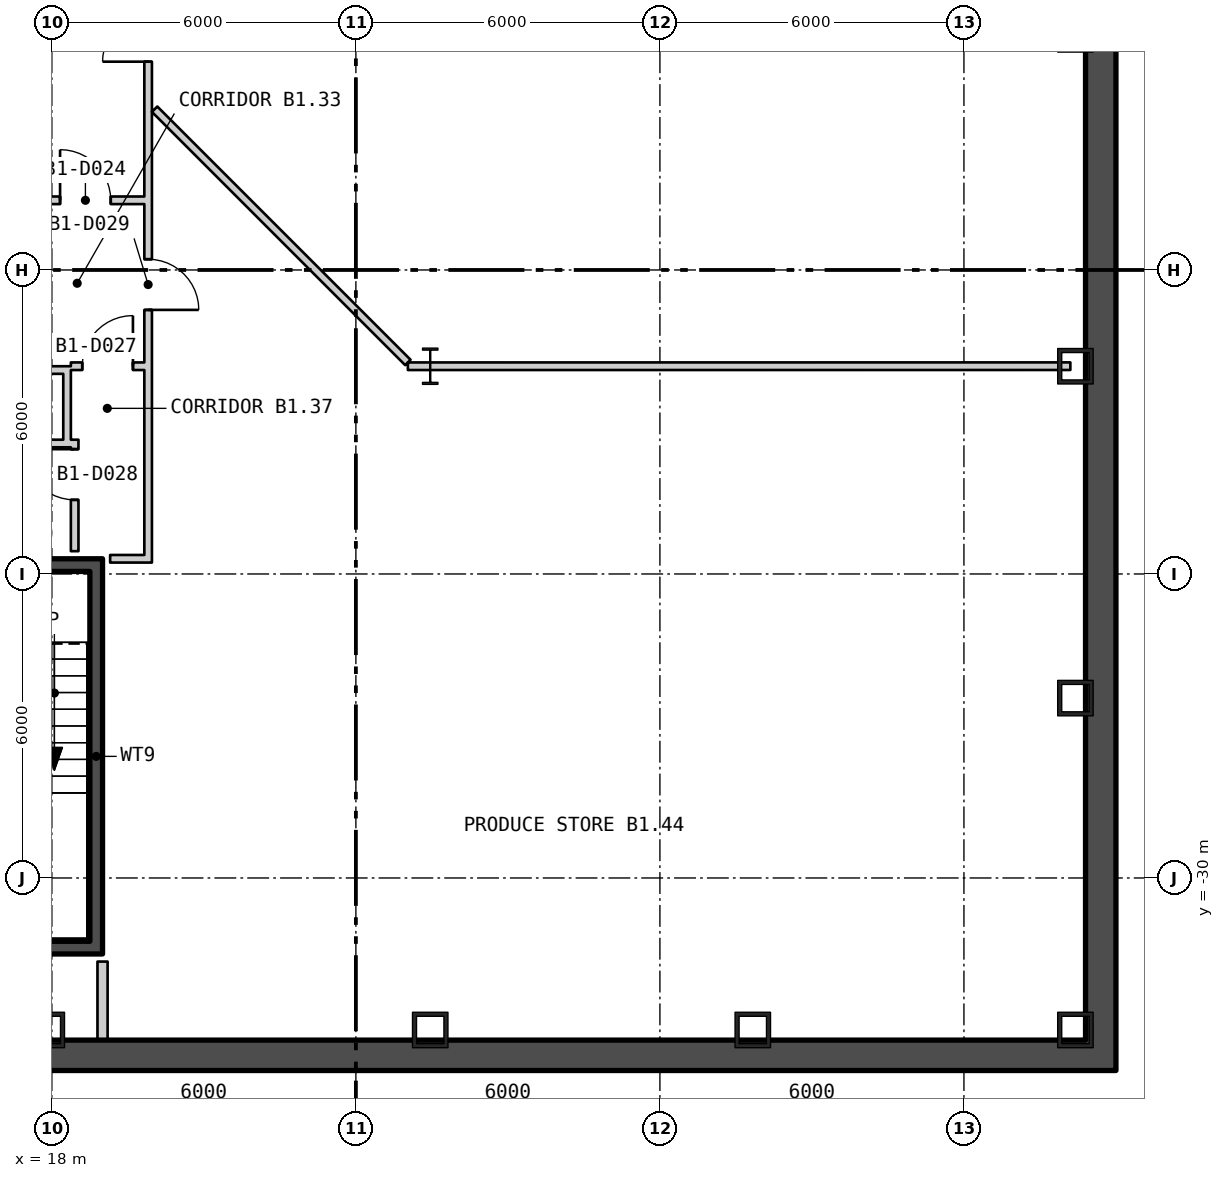
"""IFC4 building model, lengths in metres.
Left out: names, types, materials, properties, quantities, classifications, styles, units other than length and angle.
Written with IfcOpenShell. Run it as: python <this file> out.ifc"""

import sys

from ifc_helpers import new_model, si_unit, direction, frame, frame_2d, origin, origin_2d, place, context, subcontext, project, spatial, rectangle, hollow_rectangle, i_section, extrude, element, fill, save


model = new_model("IFC4")
c1 = context("Model", 3, precision=1e-05, world=origin(), true_north=direction((0.0, 1.0)))
c2 = subcontext(c1, "Body", "Model", "MODEL_VIEW")
j1 = project(units=[si_unit("LENGTHUNIT", "METRE"), si_unit("PLANEANGLEUNIT", "RADIAN")], contexts=[c1])
p1 = place(None, origin())
s1 = spatial("IfcSite", under=j1, at=p1, CompositionType="ELEMENT")
p2 = place(p1, origin())
s2 = spatial("IfcBuilding", under=s1, at=p2, CompositionType="ELEMENT")
p3 = place(p2, frame((0.0, 0.0, -5.7)))
s3 = spatial("IfcBuildingStorey", under=s2, at=p3, CompositionType="ELEMENT", Elevation=-5.7)
for number, where, z_axis, x_axis in (
    (1, (38.2, -33.0, 0.0), (0.0, 0.0, 1.0), (0.0, 1.0, 0.0)),
    (2, (38.2, -26.45, 0.0), (0.0, 0.0, 1.0), (0.0, 1.0, 0.0)),
    (3, (38.2, -19.9, 0.0), (0.0, 0.0, 1.0), (0.0, 1.0, 0.0)),
    (4, (17.9, -33.0, 0.0), (0.0, 0.0, 1.0), (1.0, 0.0, 0.0)),
    (5, (25.467, -33.0, 0.0), (0.0, 0.0, 1.0), (1.0, 0.0, 0.0)),
    (6, (31.833, -33.0, 0.0), (0.0, 0.0, 1.0), (1.0, 0.0, 0.0)),
):
    element("IfcColumn", number, at=place(p3, frame(where, z_axis=z_axis, x_axis=x_axis)), inside=s3, PredefinedType="COLUMN", context=c2, shape_type="SweptSolid", body=[
        extrude(hollow_rectangle(XDim=0.7, YDim=0.7, WallThickness=0.08, at=origin_2d()), origin(), (0.0, 0.0, 1.0), 5.7),
    ])
p4 = place(p3, frame((25.467, -19.9, 0.0), z_axis=(0.0, 0.0, 1.0), x_axis=(1.0, 0.0, 0.0)))
e7 = element("IfcColumn", 7, at=p4, inside=s3, PredefinedType="COLUMN", context=c2, shape_type="SweptSolid", body=[
    extrude(i_section(OverallWidth=0.304, OverallDepth=0.716, WebThickness=0.021, FlangeThickness=0.04, at=origin_2d()), origin(), (0.0, 0.0, 1.0), 5.7),
])
p5 = place(p3, frame((-39.0, -33.5, -0.4), z_axis=(0.0, 0.0, 1.0), x_axis=(1.0, 0.0, 0.0)))
e8 = element("IfcWall", 8, at=p5, inside=s3, PredefinedType="STANDARD", context=c2, shape_type="SweptSolid", body=[
    extrude(rectangle(XDim=78.0, YDim=0.6, at=frame_2d((39.0, 0.0))), origin(), (0.0, 0.0, 1.0), 5.7),
])
p6 = place(p3, frame((38.7, -33.2, -0.4), z_axis=(0.0, 0.0, 1.0), x_axis=(0.0, 1.0, 0.0)))
e9 = element("IfcWall", 9, at=p6, inside=s3, PredefinedType="STANDARD", context=c2, shape_type="SweptSolid", body=[
    extrude(rectangle(XDim=52.8, YDim=0.6, at=frame_2d((26.4, 0.0))), origin(), (0.0, 0.0, 1.0), 5.7),
])
p7 = place(p3, frame((18.875, -31.25, 0.0), z_axis=(0.0, 0.0, 1.0), x_axis=(0.0, 1.0, 0.0)))
e10 = element("IfcWall", 10, at=p7, inside=s3, PredefinedType="SHEAR", context=c2, shape_type="SweptSolid", body=[
    extrude(rectangle(XDim=7.3, YDim=0.25, at=frame_2d((3.65, 0.0))), origin(), (0.0, 0.0, 1.0), 5.25),
])
p8 = place(p3, frame((15.5, -31.375, 0.0), z_axis=(0.0, 0.0, 1.0), x_axis=(1.0, 0.0, 0.0)))
e11 = element("IfcWall", 11, at=p8, inside=s3, PredefinedType="SHEAR", context=c2, shape_type="SweptSolid", body=[
    extrude(rectangle(XDim=3.5, YDim=0.25, at=frame_2d((1.75, 0.0))), origin(), (0.0, 0.0, 1.0), 5.25),
])
p9 = place(p3, frame((15.5, -23.825, 0.0), z_axis=(0.0, 0.0, 1.0), x_axis=(1.0, 0.0, 0.0)))
e12 = element("IfcWall", 12, at=p9, inside=s3, PredefinedType="SHEAR", context=c2, shape_type="SweptSolid", body=[
    extrude(rectangle(XDim=3.5, YDim=0.25, at=frame_2d((1.75, 0.0))), origin(), (0.0, 0.0, 1.0), 5.25),
])
p10 = place(p9, frame((1.15, 0.0, 0.0)))
e13 = element("IfcOpeningElement", 13, at=p10, cuts=e12, PredefinedType="OPENING", context=c2, shape_type="SweptSolid", body=[
    extrude(rectangle(XDim=1.2, YDim=2.1, at=frame_2d((0.6, 1.05))), frame((0.0, 0.135, 0.0), z_axis=(0.0, -1.0, 0.0), x_axis=(1.0, 0.0, 0.0)), (0.0, 0.0, 1.0), 0.27),
])
p11 = place(p3, frame((17.5, -16.625, 0.0), z_axis=(0.0, 0.0, 1.0), x_axis=(1.0, 0.0, 0.0)))
e14 = element("IfcWall", 14, at=p11, inside=s3, PredefinedType="PARTITIONING", context=c2, shape_type="SweptSolid", body=[
    extrude(rectangle(XDim=2.325, YDim=0.15, at=frame_2d((1.163, 0.0))), origin(), (0.0, 0.0, 1.0), 5.25),
])
p12 = place(p11, frame((0.662, 0.0, 0.0)))
e15 = element("IfcOpeningElement", 15, at=p12, cuts=e14, PredefinedType="OPENING", context=c2, shape_type="SweptSolid", body=[
    extrude(rectangle(XDim=1.0, YDim=2.1, at=frame_2d((0.5, 1.05))), frame((0.0, 0.085, 0.0), z_axis=(0.0, -1.0, 0.0), x_axis=(1.0, 0.0, 0.0)), (0.0, 0.0, 1.0), 0.17),
])
for number, where, z_axis, x_axis in (
    (16, (17.575, -21.425, 0.0), (0.0, 0.0, 1.0), (1.0, 0.0, 0.0)),
    (17, (17.575, -19.975, 0.0), (0.0, 0.0, 1.0), (1.0, 0.0, 0.0)),
):
    element("IfcWall", number, at=place(p3, frame(where, z_axis=z_axis, x_axis=x_axis)), inside=s3, PredefinedType="PARTITIONING", context=c2, shape_type="SweptSolid", body=[
        extrude(rectangle(XDim=0.65, YDim=0.15, at=frame_2d((0.325, 0.0))), origin(), (0.0, 0.0, 1.0), 5.25),
    ])
p13 = place(p3, frame((18.3, -21.5, 0.0), z_axis=(0.0, 0.0, 1.0), x_axis=(0.0, 1.0, 0.0)))
e18 = element("IfcWall", 18, at=p13, inside=s3, PredefinedType="PARTITIONING", context=c2, shape_type="SweptSolid", body=[
    extrude(rectangle(XDim=1.6, YDim=0.15, at=frame_2d((0.8, 0.0))), origin(), (0.0, 0.0, 1.0), 5.25),
])
p14 = place(p3, frame((18.375, -19.9, 0.0), z_axis=(0.0, 0.0, 1.0), x_axis=(1.0, 0.0, 0.0)))
e19 = element("IfcWall", 19, at=p14, inside=s3, PredefinedType="PARTITIONING", context=c2, shape_type="SweptSolid", body=[
    extrude(rectangle(XDim=1.45, YDim=0.15, at=frame_2d((0.725, 0.0))), origin(), (0.0, 0.0, 1.0), 5.25),
])
p15 = place(p14, frame((0.225, 0.0, 0.0)))
e20 = element("IfcOpeningElement", 20, at=p15, cuts=e19, PredefinedType="OPENING", context=c2, shape_type="SweptSolid", body=[
    extrude(rectangle(XDim=1.0, YDim=2.1, at=frame_2d((0.5, 1.05))), frame((0.0, 0.085, 0.0), z_axis=(0.0, -1.0, 0.0), x_axis=(1.0, 0.0, 0.0)), (0.0, 0.0, 1.0), 0.17),
])
p16 = place(p3, frame((18.45, -23.55, 0.0), z_axis=(0.0, 0.0, 1.0), x_axis=(0.0, 1.0, 0.0)))
e21 = element("IfcWall", 21, at=p16, inside=s3, PredefinedType="PARTITIONING", context=c2, shape_type="SweptSolid", body=[
    extrude(rectangle(XDim=2.2, YDim=0.15, at=frame_2d((1.1, 0.0))), origin(), (0.0, 0.0, 1.0), 5.25),
])
p17 = place(p16, frame((1.013, 0.0, 0.0)))
e22 = element("IfcOpeningElement", 22, at=p17, cuts=e21, PredefinedType="OPENING", context=c2, shape_type="SweptSolid", body=[
    extrude(rectangle(XDim=1.0, YDim=2.1, at=frame_2d((0.5, 1.05))), frame((0.0, 0.085, 0.0), z_axis=(0.0, -1.0, 0.0), x_axis=(1.0, 0.0, 0.0)), (0.0, 0.0, 1.0), 0.17),
])
p18 = place(p3, frame((19.0, -33.348, 0.0), z_axis=(0.0, 0.0, 1.0), x_axis=(0.0, 1.0, 0.0)))
e23 = element("IfcWall", 23, at=p18, inside=s3, PredefinedType="PARTITIONING", context=c2, shape_type="SweptSolid", body=[
    extrude(rectangle(XDim=1.698, YDim=0.2, at=frame_2d((0.849, 0.0))), origin(), (0.0, 0.0, 1.0), 5.25),
])
p19 = place(p3, frame((19.15, -23.7, 0.0), z_axis=(0.0, 0.0, 1.0), x_axis=(1.0, 0.0, 0.0)))
e24 = element("IfcWall", 24, at=p19, inside=s3, PredefinedType="PARTITIONING", context=c2, shape_type="SweptSolid", body=[
    extrude(rectangle(XDim=0.675, YDim=0.15, at=frame_2d((0.338, 0.0))), origin(), (0.0, 0.0, 1.0), 5.25),
])
p20 = place(p3, frame((19.9, -23.775, 0.0), z_axis=(0.0, 0.0, 1.0), x_axis=(0.0, 1.0, 0.0)))
e25 = element("IfcWall", 25, at=p20, inside=s3, PredefinedType="PARTITIONING", context=c2, shape_type="SweptSolid", body=[
    extrude(rectangle(XDim=21.187, YDim=0.15, at=frame_2d((10.594, 0.0))), origin(), (0.0, 0.0, 1.0), 5.25),
])
p21 = place(p20, frame((4.987, 0.0, 0.0)))
e26 = element("IfcOpeningElement", 26, at=p21, cuts=e25, PredefinedType="OPENING", context=c2, shape_type="SweptSolid", body=[
    extrude(rectangle(XDim=1.0, YDim=2.1, at=frame_2d((0.5, 1.05))), frame((0.0, 0.085, 0.0), z_axis=(0.0, -1.0, 0.0), x_axis=(1.0, 0.0, 0.0)), (0.0, 0.0, 1.0), 0.17),
])
p22 = place(p20, frame((9.886, 0.0, 0.0)))
e27 = element("IfcOpeningElement", 27, at=p22, cuts=e25, PredefinedType="OPENING", context=c2, shape_type="SweptSolid", body=[
    extrude(rectangle(XDim=1.8, YDim=2.1, at=frame_2d((0.9, 1.05))), frame((0.0, 0.085, 0.0), z_axis=(0.0, -1.0, 0.0), x_axis=(1.0, 0.0, 0.0)), (0.0, 0.0, 1.0), 0.17),
])
p23 = place(p20, frame((14.973, 0.0, 0.0)))
e28 = element("IfcOpeningElement", 28, at=p23, cuts=e25, PredefinedType="OPENING", context=c2, shape_type="SweptSolid", body=[
    extrude(rectangle(XDim=1.8, YDim=2.1, at=frame_2d((0.9, 1.05))), frame((0.0, 0.085, 0.0), z_axis=(0.0, -1.0, 0.0), x_axis=(1.0, 0.0, 0.0)), (0.0, 0.0, 1.0), 0.17),
])
p24 = place(p20, frame((19.062, 0.0, 0.0)))
e29 = element("IfcOpeningElement", 29, at=p24, cuts=e25, PredefinedType="OPENING", context=c2, shape_type="SweptSolid", body=[
    extrude(rectangle(XDim=1.0, YDim=2.1, at=frame_2d((0.5, 1.05))), frame((0.0, 0.085, 0.0), z_axis=(0.0, -1.0, 0.0), x_axis=(1.0, 0.0, 0.0)), (0.0, 0.0, 1.0), 0.17),
])
p25 = place(p3, frame((20.028, -14.827, 0.0), z_axis=(0.0, 0.0, 1.0), x_axis=(0.707106781187, -0.707106781187, 0.0)))
e30 = element("IfcWall", 30, at=p25, inside=s3, PredefinedType="PARTITIONING", context=c2, shape_type="SweptSolid", body=[
    extrude(rectangle(XDim=7.068, YDim=0.15, at=frame_2d((3.534, 0.0))), origin(), (0.0, 0.0, 1.0), 5.25),
])
p26 = place(p3, frame((25.026, -19.9, 0.0), z_axis=(0.0, 0.0, 1.0), x_axis=(0.999999997075, 7.6487685e-05, 0.0)))
e31 = element("IfcWall", 31, at=p26, inside=s3, PredefinedType="PARTITIONING", context=c2, shape_type="SweptSolid", body=[
    extrude(rectangle(XDim=13.074, YDim=0.15, at=frame_2d((6.537, 0.0))), origin(), (0.0, 0.0, 1.0), 5.25),
])
p27 = place(p12, origin())
e32 = element("IfcDoor", 32, at=p27, inside=s3, OperationType="SINGLE_SWING_RIGHT", PredefinedType="DOOR", context=c2, shape_type="SweptSolid", body=[
    extrude(rectangle(XDim=1.0, YDim=2.1, at=frame_2d((0.5, 1.05))), frame((0.0, 0.025, 0.0), z_axis=(0.0, -1.0, 0.0), x_axis=(1.0, 0.0, 0.0)), (0.0, 0.0, 1.0), 0.05),
])
fill(e15, e32)
p28 = place(p15, origin())
e33 = element("IfcDoor", 33, at=p28, inside=s3, OperationType="SINGLE_SWING_LEFT", PredefinedType="DOOR", context=c2, shape_type="SweptSolid", body=[
    extrude(rectangle(XDim=1.0, YDim=2.1, at=frame_2d((0.5, 1.05))), frame((0.0, 0.025, 0.0), z_axis=(0.0, -1.0, 0.0), x_axis=(1.0, 0.0, 0.0)), (0.0, 0.0, 1.0), 0.05),
])
fill(e20, e33)
p29 = place(p17, origin())
e34 = element("IfcDoor", 34, at=p29, inside=s3, OperationType="SINGLE_SWING_LEFT", PredefinedType="DOOR", context=c2, shape_type="SweptSolid", body=[
    extrude(rectangle(XDim=1.0, YDim=2.1, at=frame_2d((0.5, 1.05))), frame((0.0, 0.025, 0.0), z_axis=(0.0, -1.0, 0.0), x_axis=(1.0, 0.0, 0.0)), (0.0, 0.0, 1.0), 0.05),
])
fill(e22, e34)
p30 = place(p21, origin())
e35 = element("IfcDoor", 35, at=p30, inside=s3, OperationType="SINGLE_SWING_LEFT", PredefinedType="DOOR", context=c2, shape_type="SweptSolid", body=[
    extrude(rectangle(XDim=1.0, YDim=2.1, at=frame_2d((0.5, 1.05))), frame((0.0, 0.025, 0.0), z_axis=(0.0, -1.0, 0.0), x_axis=(1.0, 0.0, 0.0)), (0.0, 0.0, 1.0), 0.05),
])
fill(e26, e35)
p31 = place(p22, origin())
e36 = element("IfcDoor", 36, at=p31, inside=s3, OperationType="DOUBLE_DOOR_SINGLE_SWING", PredefinedType="DOOR", context=c2, shape_type="SweptSolid", body=[
    extrude(rectangle(XDim=1.8, YDim=2.1, at=frame_2d((0.9, 1.05))), frame((0.0, 0.025, 0.0), z_axis=(0.0, -1.0, 0.0), x_axis=(1.0, 0.0, 0.0)), (0.0, 0.0, 1.0), 0.05),
])
fill(e27, e36)
save(model, sys.argv[1])
